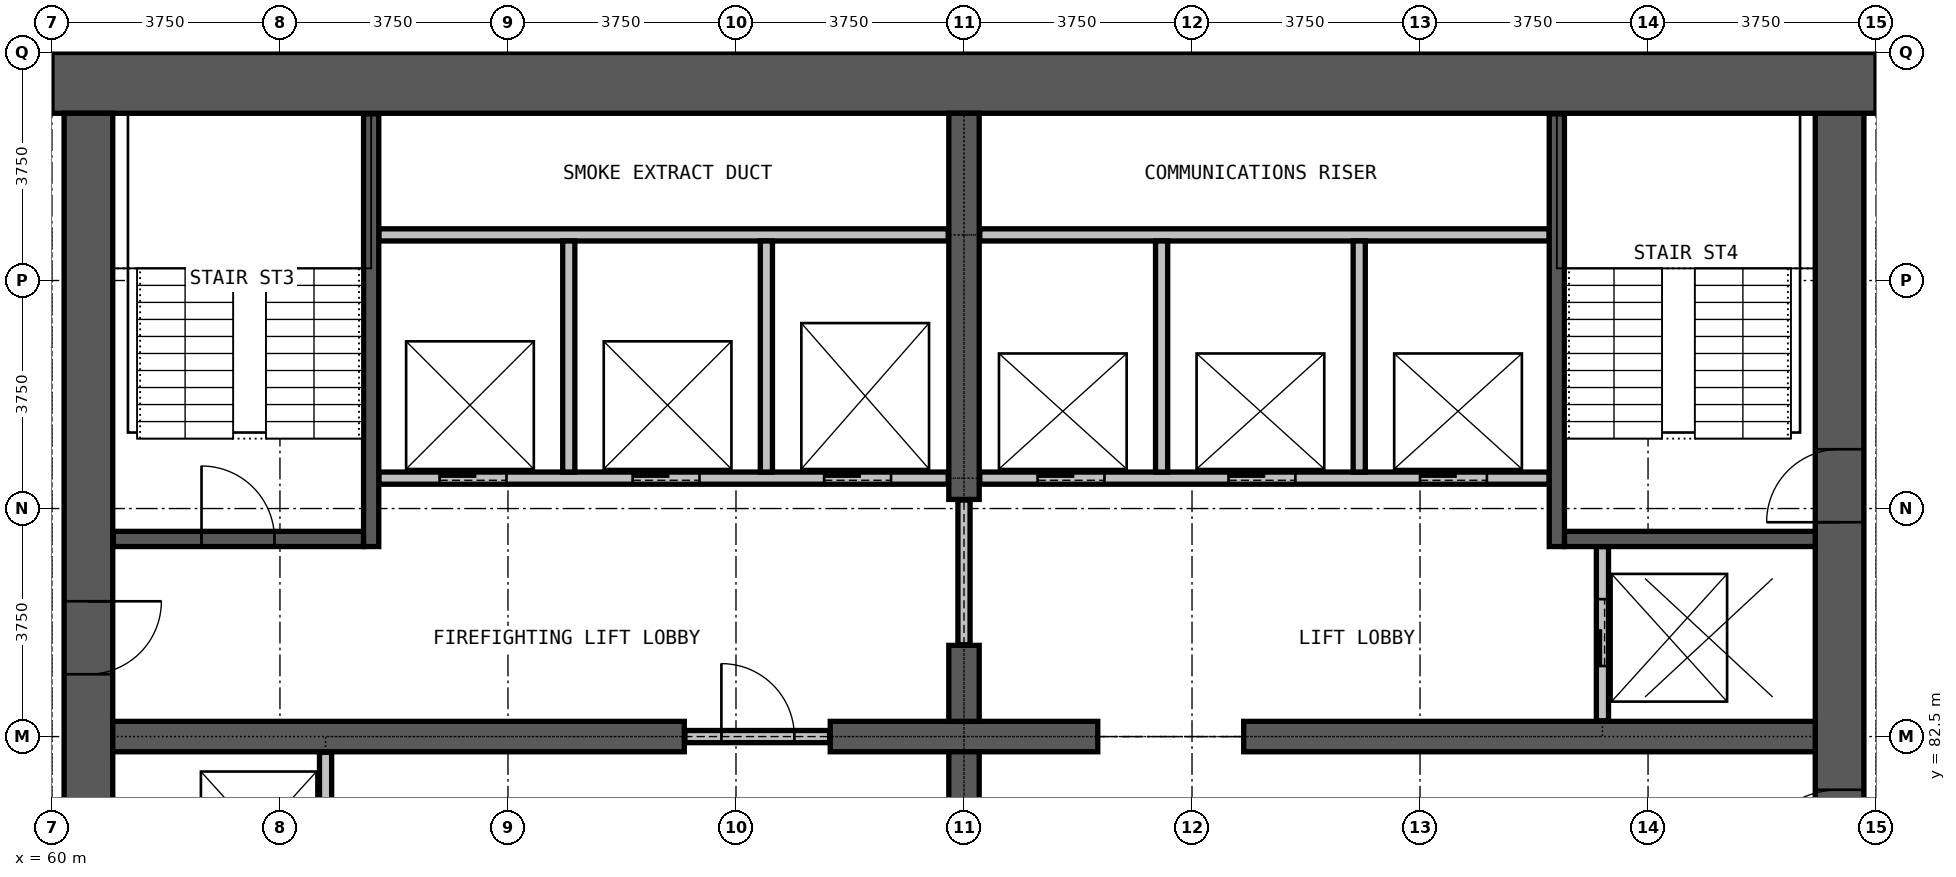
"""IFC4 building model, lengths in metres.
Left out: names, types, materials, properties, quantities, classifications, styles, units other than length and angle.
Written with IfcOpenShell. Run it as: python <this file> out.ifc"""

import sys

from ifc_helpers import new_model, si_unit, direction, frame, frame_2d, origin, place, context, subcontext, project, spatial, rectangle, extrude, element, fill, save


model = new_model("IFC4")
c1 = context("Model", 3, precision=1e-05, world=origin(), true_north=direction((0.0, 1.0)))
c2 = subcontext(c1, "Body", "Model", "MODEL_VIEW")
j1 = project(units=[si_unit("LENGTHUNIT", "METRE"), si_unit("PLANEANGLEUNIT", "RADIAN")], contexts=[c1])
p1 = place(None, origin())
s1 = spatial("IfcSite", under=j1, at=p1, CompositionType="ELEMENT")
p2 = place(p1, origin())
s2 = spatial("IfcBuilding", under=s1, at=p2, CompositionType="ELEMENT")
p3 = place(p2, frame((0.0, 0.0, 147.7)))
s3 = spatial("IfcBuildingStorey", under=s2, at=p3, CompositionType="ELEMENT", Elevation=147.7)
p4 = place(p3, frame((89.4, 72.25, 0.0), z_axis=(0.0, 0.0, 1.0), x_axis=(0.0, 1.0, 0.0)))
e1 = element("IfcWall", 1, at=p4, inside=s3, PredefinedType="SHEAR", context=c2, shape_type="SweptSolid", body=[
    extrude(rectangle(XDim=20.5, YDim=0.8, at=frame_2d((10.25, 0.0))), origin(), (0.0, 0.0, 1.0), 3.6),
])
p5 = place(p4, frame((0.275, 0.0, 0.0)))
e2 = element("IfcOpeningElement", 2, at=p5, cuts=e1, PredefinedType="OPENING", context=c2, shape_type="SweptSolid", body=[
    extrude(rectangle(XDim=1.2, YDim=2.2, at=frame_2d((0.6, 1.1))), frame((0.0, 0.41, 0.0), z_axis=(0.0, -1.0, 0.0), x_axis=(1.0, 0.0, 0.0)), (0.0, 0.0, 1.0), 0.82),
])
p6 = place(p4, frame((13.775, 0.0, 0.0)))
e3 = element("IfcOpeningElement", 3, at=p6, cuts=e1, PredefinedType="OPENING", context=c2, shape_type="SweptSolid", body=[
    extrude(rectangle(XDim=1.2, YDim=2.2, at=frame_2d((0.6, 1.1))), frame((0.0, 0.41, 0.0), z_axis=(0.0, -1.0, 0.0), x_axis=(1.0, 0.0, 0.0)), (0.0, 0.0, 1.0), 0.82),
])
p7 = place(p4, frame((7.875, 0.0, 0.0)))
e4 = element("IfcOpeningElement", 4, at=p7, cuts=e1, PredefinedType="OPENING", context=c2, shape_type="SweptSolid", body=[
    extrude(rectangle(XDim=1.5, YDim=2.2, at=frame_2d((0.75, 1.1))), frame((0.0, 0.41, 0.0), z_axis=(0.0, -1.0, 0.0), x_axis=(1.0, 0.0, 0.0)), (0.0, 0.0, 1.0), 0.82),
])
p8 = place(p3, frame((90.0, 93.25, 0.0), z_axis=(0.0, 0.0, 1.0), x_axis=(-1.0, 0.0, 0.0)))
e5 = element("IfcWall", 5, at=p8, inside=s3, PredefinedType="SHEAR", context=c2, shape_type="SweptSolid", body=[
    extrude(rectangle(XDim=30.0, YDim=1.0, at=frame_2d((15.0, 0.0))), origin(), (0.0, 0.0, 1.0), 3.6),
])
p9 = place(p3, frame((60.6, 92.75, 0.0), z_axis=(0.0, 0.0, 1.0), x_axis=(0.0, -1.0, 0.0)))
e6 = element("IfcWall", 6, at=p9, inside=s3, PredefinedType="SHEAR", context=c2, shape_type="SweptSolid", body=[
    extrude(rectangle(XDim=20.5, YDim=0.8, at=frame_2d((10.25, 0.0))), origin(), (0.0, 0.0, 1.0), 3.6),
])
p10 = place(p9, frame((19.025, 0.0, 0.0)))
e7 = element("IfcOpeningElement", 7, at=p10, cuts=e6, PredefinedType="OPENING", context=c2, shape_type="SweptSolid", body=[
    extrude(rectangle(XDim=1.2, YDim=2.2, at=frame_2d((0.6, 1.1))), frame((0.0, 0.41, 0.0), z_axis=(0.0, -1.0, 0.0), x_axis=(1.0, 0.0, 0.0)), (0.0, 0.0, 1.0), 0.82),
])
p11 = place(p9, frame((8.025, 0.0, 0.0)))
e8 = element("IfcOpeningElement", 8, at=p11, cuts=e6, PredefinedType="OPENING", context=c2, shape_type="SweptSolid", body=[
    extrude(rectangle(XDim=1.2, YDim=2.2, at=frame_2d((0.6, 1.1))), frame((0.0, 0.41, 0.0), z_axis=(0.0, -1.0, 0.0), x_axis=(1.0, 0.0, 0.0)), (0.0, 0.0, 1.0), 0.82),
])
p12 = place(p3, frame((61.0, 82.5, 0.0), z_axis=(0.0, 0.0, 1.0), x_axis=(1.0, 0.0, 0.0)))
e9 = element("IfcWall", 9, at=p12, inside=s3, PredefinedType="SHEAR", context=c2, shape_type="SweptSolid", body=[
    extrude(rectangle(XDim=9.4, YDim=0.5, at=frame_2d((4.7, 0.0))), origin(), (0.0, 0.0, 1.0), 3.6),
])
p13 = place(p3, frame((72.8, 82.5, 0.0), z_axis=(0.0, 0.0, 1.0), x_axis=(1.0, 0.0, 0.0)))
e10 = element("IfcWall", 10, at=p13, inside=s3, PredefinedType="SHEAR", context=c2, shape_type="SweptSolid", body=[
    extrude(rectangle(XDim=4.4, YDim=0.5, at=frame_2d((2.2, 0.0))), origin(), (0.0, 0.0, 1.0), 3.6),
])
p14 = place(p3, frame((79.6, 82.5, 0.0), z_axis=(0.0, 0.0, 1.0), x_axis=(1.0, 0.0, 0.0)))
e11 = element("IfcWall", 11, at=p14, inside=s3, PredefinedType="SHEAR", context=c2, shape_type="SweptSolid", body=[
    extrude(rectangle(XDim=9.4, YDim=0.5, at=frame_2d((4.7, 0.0))), origin(), (0.0, 0.0, 1.0), 3.6),
])
for number, where, z_axis, x_axis in (
    (12, (75.0, 81.0, 0.0), (0.0, 0.0, 1.0), (0.0, 1.0, 0.0)),
    (13, (75.0, 82.75, 0.0), (0.0, 0.0, 1.0), (0.0, 1.0, 0.0)),
):
    element("IfcWall", number, at=place(p3, frame(where, z_axis=z_axis, x_axis=x_axis)), inside=s3, PredefinedType="SHEAR", context=c2, shape_type="SweptSolid", body=[
        extrude(rectangle(XDim=1.25, YDim=0.5, at=frame_2d((0.625, 0.0))), origin(), (0.0, 0.0, 1.0), 3.6),
    ])
p15 = place(p3, frame((75.0, 86.4, 0.0), z_axis=(0.0, 0.0, 1.0), x_axis=(0.0, 1.0, 0.0)))
e14 = element("IfcWall", 14, at=p15, inside=s3, PredefinedType="SHEAR", context=c2, shape_type="SweptSolid", body=[
    extrude(rectangle(XDim=6.35, YDim=0.5, at=frame_2d((3.175, 0.0))), origin(), (0.0, 0.0, 1.0), 3.6),
])
p16 = place(p3, frame((70.41, 82.5, 0.0), z_axis=(0.0, 0.0, 1.0), x_axis=(1.0, 0.0, 0.0)))
e15 = element("IfcWall", 15, at=p16, inside=s3, PredefinedType="PARTITIONING", context=c2, shape_type="SweptSolid", body=[
    extrude(rectangle(XDim=2.38, YDim=0.2, at=frame_2d((1.19, 0.0))), origin(), (0.0, 0.0, 1.0), 2.4),
])
p17 = place(p16, frame((0.6, 0.0, 0.0)))
e16 = element("IfcOpeningElement", 16, at=p17, cuts=e15, PredefinedType="OPENING", context=c2, shape_type="SweptSolid", body=[
    extrude(rectangle(XDim=1.2, YDim=2.2, at=frame_2d((0.6, 1.1))), frame((0.0, 0.11, 0.0), z_axis=(0.0, -1.0, 0.0), x_axis=(1.0, 0.0, 0.0)), (0.0, 0.0, 1.0), 0.22),
])
p18 = place(p3, frame((75.0, 84.01, 0.0), z_axis=(0.0, 0.0, 1.0), x_axis=(0.0, 1.0, 0.0)))
e17 = element("IfcWall", 17, at=p18, inside=s3, PredefinedType="PARTITIONING", context=c2, shape_type="SweptSolid", body=[
    extrude(rectangle(XDim=2.38, YDim=0.2, at=frame_2d((1.19, 0.0))), origin(), (0.0, 0.0, 1.0), 2.4),
])
p19 = place(p3, frame((65.375, 86.75, 0.0), z_axis=(0.0, 0.0, 1.0), x_axis=(1.0, 0.0, 0.0)))
e18 = element("IfcWall", 18, at=p19, inside=s3, PredefinedType="PARTITIONING", context=c2, shape_type="SweptSolid", body=[
    extrude(rectangle(XDim=9.365, YDim=0.2, at=frame_2d((4.683, 0.0))), origin(), (0.0, 0.0, 1.0), 3.3),
])
p20 = place(p19, frame((1.0, 0.0, 0.0)))
e19 = element("IfcOpeningElement", 19, at=p20, cuts=e18, PredefinedType="OPENING", context=c2, shape_type="SweptSolid", body=[
    extrude(rectangle(XDim=1.1, YDim=2.2, at=frame_2d((0.55, 1.1))), frame((0.0, 0.11, 0.0), z_axis=(0.0, -1.0, 0.0), x_axis=(1.0, 0.0, 0.0)), (0.0, 0.0, 1.0), 0.22),
])
p21 = place(p19, frame((4.175, 0.0, 0.0)))
e20 = element("IfcOpeningElement", 20, at=p21, cuts=e18, PredefinedType="OPENING", context=c2, shape_type="SweptSolid", body=[
    extrude(rectangle(XDim=1.1, YDim=2.2, at=frame_2d((0.55, 1.1))), frame((0.0, 0.11, 0.0), z_axis=(0.0, -1.0, 0.0), x_axis=(1.0, 0.0, 0.0)), (0.0, 0.0, 1.0), 0.22),
])
p22 = place(p19, frame((7.325, 0.0, 0.0)))
e21 = element("IfcOpeningElement", 21, at=p22, cuts=e18, PredefinedType="OPENING", context=c2, shape_type="SweptSolid", body=[
    extrude(rectangle(XDim=1.1, YDim=2.2, at=frame_2d((0.55, 1.1))), frame((0.0, 0.11, 0.0), z_axis=(0.0, -1.0, 0.0), x_axis=(1.0, 0.0, 0.0)), (0.0, 0.0, 1.0), 0.22),
])
p23 = place(p3, frame((75.26, 86.75, 0.0), z_axis=(0.0, 0.0, 1.0), x_axis=(1.0, 0.0, 0.0)))
e22 = element("IfcWall", 22, at=p23, inside=s3, PredefinedType="PARTITIONING", context=c2, shape_type="SweptSolid", body=[
    extrude(rectangle(XDim=9.365, YDim=0.2, at=frame_2d((4.683, 0.0))), origin(), (0.0, 0.0, 1.0), 3.3),
])
p24 = place(p23, frame((0.95, 0.0, 0.0)))
e23 = element("IfcOpeningElement", 23, at=p24, cuts=e22, PredefinedType="OPENING", context=c2, shape_type="SweptSolid", body=[
    extrude(rectangle(XDim=1.1, YDim=2.2, at=frame_2d((0.55, 1.1))), frame((0.0, 0.11, 0.0), z_axis=(0.0, -1.0, 0.0), x_axis=(1.0, 0.0, 0.0)), (0.0, 0.0, 1.0), 0.22),
])
p25 = place(p23, frame((4.09, 0.0, 0.0)))
e24 = element("IfcOpeningElement", 24, at=p25, cuts=e22, PredefinedType="OPENING", context=c2, shape_type="SweptSolid", body=[
    extrude(rectangle(XDim=1.1, YDim=2.2, at=frame_2d((0.55, 1.1))), frame((0.0, 0.11, 0.0), z_axis=(0.0, -1.0, 0.0), x_axis=(1.0, 0.0, 0.0)), (0.0, 0.0, 1.0), 0.22),
])
p26 = place(p23, frame((7.24, 0.0, 0.0)))
e25 = element("IfcOpeningElement", 25, at=p26, cuts=e22, PredefinedType="OPENING", context=c2, shape_type="SweptSolid", body=[
    extrude(rectangle(XDim=1.1, YDim=2.2, at=frame_2d((0.55, 1.1))), frame((0.0, 0.11, 0.0), z_axis=(0.0, -1.0, 0.0), x_axis=(1.0, 0.0, 0.0)), (0.0, 0.0, 1.0), 0.22),
])
for number, where, z_axis, x_axis in (
    (26, (65.375, 90.75, 0.0), (0.0, 0.0, 1.0), (1.0, 0.0, 0.0)),
    (27, (75.26, 90.75, 0.0), (0.0, 0.0, 1.0), (1.0, 0.0, 0.0)),
):
    element("IfcWall", number, at=place(p3, frame(where, z_axis=z_axis, x_axis=x_axis)), inside=s3, PredefinedType="PARTITIONING", context=c2, shape_type="SweptSolid", body=[
        extrude(rectangle(XDim=9.365, YDim=0.2, at=frame_2d((4.683, 0.0))), origin(), (0.0, 0.0, 1.0), 3.3),
    ])
p27 = place(p3, frame((64.5, 79.375, 0.0), z_axis=(0.0, 0.0, 1.0), x_axis=(0.0, 1.0, 0.0)))
e28 = element("IfcWall", 28, at=p27, inside=s3, PredefinedType="PARTITIONING", context=c2, shape_type="SweptSolid", body=[
    extrude(rectangle(XDim=2.865, YDim=0.2, at=frame_2d((1.433, 0.0))), origin(), (0.0, 0.0, 1.0), 3.3),
])
for number, where, z_axis, x_axis in (
    (29, (68.5, 86.85, 0.0), (0.0, 0.0, 1.0), (0.0, 1.0, 0.0)),
    (30, (71.75, 86.85, 0.0), (0.0, 0.0, 1.0), (0.0, 1.0, 0.0)),
    (31, (78.25, 86.85, 0.0), (0.0, 0.0, 1.0), (0.0, 1.0, 0.0)),
    (32, (81.5, 86.85, 0.0), (0.0, 0.0, 1.0), (0.0, 1.0, 0.0)),
):
    element("IfcWall", number, at=place(p3, frame(where, z_axis=z_axis, x_axis=x_axis)), inside=s3, PredefinedType="PARTITIONING", context=c2, shape_type="SweptSolid", body=[
        extrude(rectangle(XDim=3.8, YDim=0.2, at=frame_2d((1.9, 0.0))), origin(), (0.0, 0.0, 1.0), 3.3),
    ])
p28 = place(p3, frame((85.5, 82.76, 0.0), z_axis=(0.0, 0.0, 1.0), x_axis=(0.0, 1.0, 0.0)))
e33 = element("IfcWall", 33, at=p28, inside=s3, PredefinedType="PARTITIONING", context=c2, shape_type="SweptSolid", body=[
    extrude(rectangle(XDim=2.865, YDim=0.2, at=frame_2d((1.433, 0.0))), origin(), (0.0, 0.0, 1.0), 3.3),
])
p29 = place(p28, frame((0.9, 0.0, 0.0)))
e34 = element("IfcOpeningElement", 34, at=p29, cuts=e33, PredefinedType="OPENING", context=c2, shape_type="SweptSolid", body=[
    extrude(rectangle(XDim=1.1, YDim=2.2, at=frame_2d((0.55, 1.1))), frame((0.0, 0.11, 0.0), z_axis=(0.0, -1.0, 0.0), x_axis=(1.0, 0.0, 0.0)), (0.0, 0.0, 1.0), 0.22),
])
p30 = place(p3, frame((61.01, 85.75, 0.0), z_axis=(0.0, 0.0, 1.0), x_axis=(1.0, 0.0, 0.0)))
e35 = element("IfcWall", 35, at=p30, inside=s3, PredefinedType="PARTITIONING", context=c2, shape_type="SweptSolid", body=[
    extrude(rectangle(XDim=4.115, YDim=0.25, at=frame_2d((2.058, 0.0))), origin(), (0.0, 0.0, 1.0), 3.3),
])
p31 = place(p30, frame((1.45, 0.0, 0.0)))
e36 = element("IfcOpeningElement", 36, at=p31, cuts=e35, PredefinedType="OPENING", context=c2, shape_type="SweptSolid", body=[
    extrude(rectangle(XDim=1.2, YDim=2.2, at=frame_2d((0.6, 1.1))), frame((0.0, 0.135, 0.0), z_axis=(0.0, -1.0, 0.0), x_axis=(1.0, 0.0, 0.0)), (0.0, 0.0, 1.0), 0.27),
])
p32 = place(p3, frame((84.875, 85.75, 0.0), z_axis=(0.0, 0.0, 1.0), x_axis=(1.0, 0.0, 0.0)))
e37 = element("IfcWall", 37, at=p32, inside=s3, PredefinedType="PARTITIONING", context=c2, shape_type="SweptSolid", body=[
    extrude(rectangle(XDim=4.125, YDim=0.25, at=frame_2d((2.062, 0.0))), origin(), (0.0, 0.0, 1.0), 3.3),
])
for number, where, z_axis, x_axis in (
    (38, (65.25, 85.625, 0.0), (0.0, 0.0, 1.0), (0.0, 1.0, 0.0)),
    (39, (84.75, 85.625, 0.0), (0.0, 0.0, 1.0), (0.0, 1.0, 0.0)),
):
    element("IfcWall", number, at=place(p3, frame(where, z_axis=z_axis, x_axis=x_axis)), inside=s3, PredefinedType="PARTITIONING", context=c2, shape_type="SweptSolid", body=[
        extrude(rectangle(XDim=7.115, YDim=0.25, at=frame_2d((3.558, 0.0))), origin(), (0.0, 0.0, 1.0), 3.3),
    ])
p33 = place(p24, origin())
e40 = element("IfcDoor", 40, at=p33, inside=s3, OperationType="DOUBLE_DOOR_SLIDING", PredefinedType="DOOR", context=c2, shape_type="SweptSolid", body=[
    extrude(rectangle(XDim=1.1, YDim=2.2, at=frame_2d((0.55, 1.1))), frame((0.0, 0.025, 0.0), z_axis=(0.0, -1.0, 0.0), x_axis=(1.0, 0.0, 0.0)), (0.0, 0.0, 1.0), 0.05),
])
fill(e23, e40)
p34 = place(p25, origin())
e41 = element("IfcDoor", 41, at=p34, inside=s3, OperationType="DOUBLE_DOOR_SLIDING", PredefinedType="DOOR", context=c2, shape_type="SweptSolid", body=[
    extrude(rectangle(XDim=1.1, YDim=2.2, at=frame_2d((0.55, 1.1))), frame((0.0, 0.025, 0.0), z_axis=(0.0, -1.0, 0.0), x_axis=(1.0, 0.0, 0.0)), (0.0, 0.0, 1.0), 0.05),
])
fill(e24, e41)
p35 = place(p26, origin())
e42 = element("IfcDoor", 42, at=p35, inside=s3, OperationType="DOUBLE_DOOR_SLIDING", PredefinedType="DOOR", context=c2, shape_type="SweptSolid", body=[
    extrude(rectangle(XDim=1.1, YDim=2.2, at=frame_2d((0.55, 1.1))), frame((0.0, 0.025, 0.0), z_axis=(0.0, -1.0, 0.0), x_axis=(1.0, 0.0, 0.0)), (0.0, 0.0, 1.0), 0.05),
])
fill(e25, e42)
p36 = place(p20, origin())
e43 = element("IfcDoor", 43, at=p36, inside=s3, OperationType="DOUBLE_DOOR_SLIDING", PredefinedType="DOOR", context=c2, shape_type="SweptSolid", body=[
    extrude(rectangle(XDim=1.1, YDim=2.2, at=frame_2d((0.55, 1.1))), frame((0.0, 0.025, 0.0), z_axis=(0.0, -1.0, 0.0), x_axis=(1.0, 0.0, 0.0)), (0.0, 0.0, 1.0), 0.05),
])
fill(e19, e43)
p37 = place(p21, origin())
e44 = element("IfcDoor", 44, at=p37, inside=s3, OperationType="DOUBLE_DOOR_SLIDING", PredefinedType="DOOR", context=c2, shape_type="SweptSolid", body=[
    extrude(rectangle(XDim=1.1, YDim=2.2, at=frame_2d((0.55, 1.1))), frame((0.0, 0.025, 0.0), z_axis=(0.0, -1.0, 0.0), x_axis=(1.0, 0.0, 0.0)), (0.0, 0.0, 1.0), 0.05),
])
fill(e20, e44)
p38 = place(p22, origin())
e45 = element("IfcDoor", 45, at=p38, inside=s3, OperationType="DOUBLE_DOOR_SLIDING", PredefinedType="DOOR", context=c2, shape_type="SweptSolid", body=[
    extrude(rectangle(XDim=1.1, YDim=2.2, at=frame_2d((0.55, 1.1))), frame((0.0, 0.025, 0.0), z_axis=(0.0, -1.0, 0.0), x_axis=(1.0, 0.0, 0.0)), (0.0, 0.0, 1.0), 0.05),
])
fill(e21, e45)
p39 = place(p29, origin())
e46 = element("IfcDoor", 46, at=p39, inside=s3, OperationType="DOUBLE_DOOR_SLIDING", PredefinedType="DOOR", context=c2, shape_type="SweptSolid", body=[
    extrude(rectangle(XDim=1.1, YDim=2.2, at=frame_2d((0.55, 1.1))), frame((0.0, 0.025, 0.0), z_axis=(0.0, -1.0, 0.0), x_axis=(1.0, 0.0, 0.0)), (0.0, 0.0, 1.0), 0.05),
])
fill(e34, e46)
p40 = place(p17, origin())
e47 = element("IfcDoor", 47, at=p40, inside=s3, OperationType="SINGLE_SWING_LEFT", PredefinedType="DOOR", context=c2, shape_type="SweptSolid", body=[
    extrude(rectangle(XDim=1.2, YDim=2.2, at=frame_2d((0.6, 1.1))), frame((0.0, 0.025, 0.0), z_axis=(0.0, -1.0, 0.0), x_axis=(1.0, 0.0, 0.0)), (0.0, 0.0, 1.0), 0.05),
])
fill(e16, e47)
p41 = place(p31, origin())
e48 = element("IfcDoor", 48, at=p41, inside=s3, OperationType="SINGLE_SWING_LEFT", PredefinedType="DOOR", context=c2, shape_type="SweptSolid", body=[
    extrude(rectangle(XDim=1.2, YDim=2.2, at=frame_2d((0.6, 1.1))), frame((0.0, 0.025, 0.0), z_axis=(0.0, -1.0, 0.0), x_axis=(1.0, 0.0, 0.0)), (0.0, 0.0, 1.0), 0.05),
])
fill(e36, e48)
p42 = place(p6, origin())
e49 = element("IfcDoor", 49, at=p42, inside=s3, OperationType="SINGLE_SWING_LEFT", PredefinedType="DOOR", context=c2, shape_type="SweptSolid", body=[
    extrude(rectangle(XDim=1.2, YDim=2.2, at=frame_2d((0.6, 1.1))), frame((0.0, 0.025, 0.0), z_axis=(0.0, -1.0, 0.0), x_axis=(1.0, 0.0, 0.0)), (0.0, 0.0, 1.0), 0.05),
])
fill(e3, e49)
p43 = place(p7, origin())
e50 = element("IfcDoor", 50, at=p43, inside=s3, OperationType="DOUBLE_DOOR_SINGLE_SWING", PredefinedType="DOOR", context=c2, shape_type="SweptSolid", body=[
    extrude(rectangle(XDim=1.5, YDim=2.2, at=frame_2d((0.75, 1.1))), frame((0.0, 0.025, 0.0), z_axis=(0.0, -1.0, 0.0), x_axis=(1.0, 0.0, 0.0)), (0.0, 0.0, 1.0), 0.05),
])
fill(e4, e50)
p44 = place(p11, origin())
e51 = element("IfcDoor", 51, at=p44, inside=s3, OperationType="SINGLE_SWING_RIGHT", PredefinedType="DOOR", context=c2, shape_type="SweptSolid", body=[
    extrude(rectangle(XDim=1.2, YDim=2.2, at=frame_2d((0.6, 1.1))), frame((0.0, 0.025, 0.0), z_axis=(0.0, -1.0, 0.0), x_axis=(1.0, 0.0, 0.0)), (0.0, 0.0, 1.0), 0.05),
])
fill(e8, e51)
save(model, sys.argv[1])
